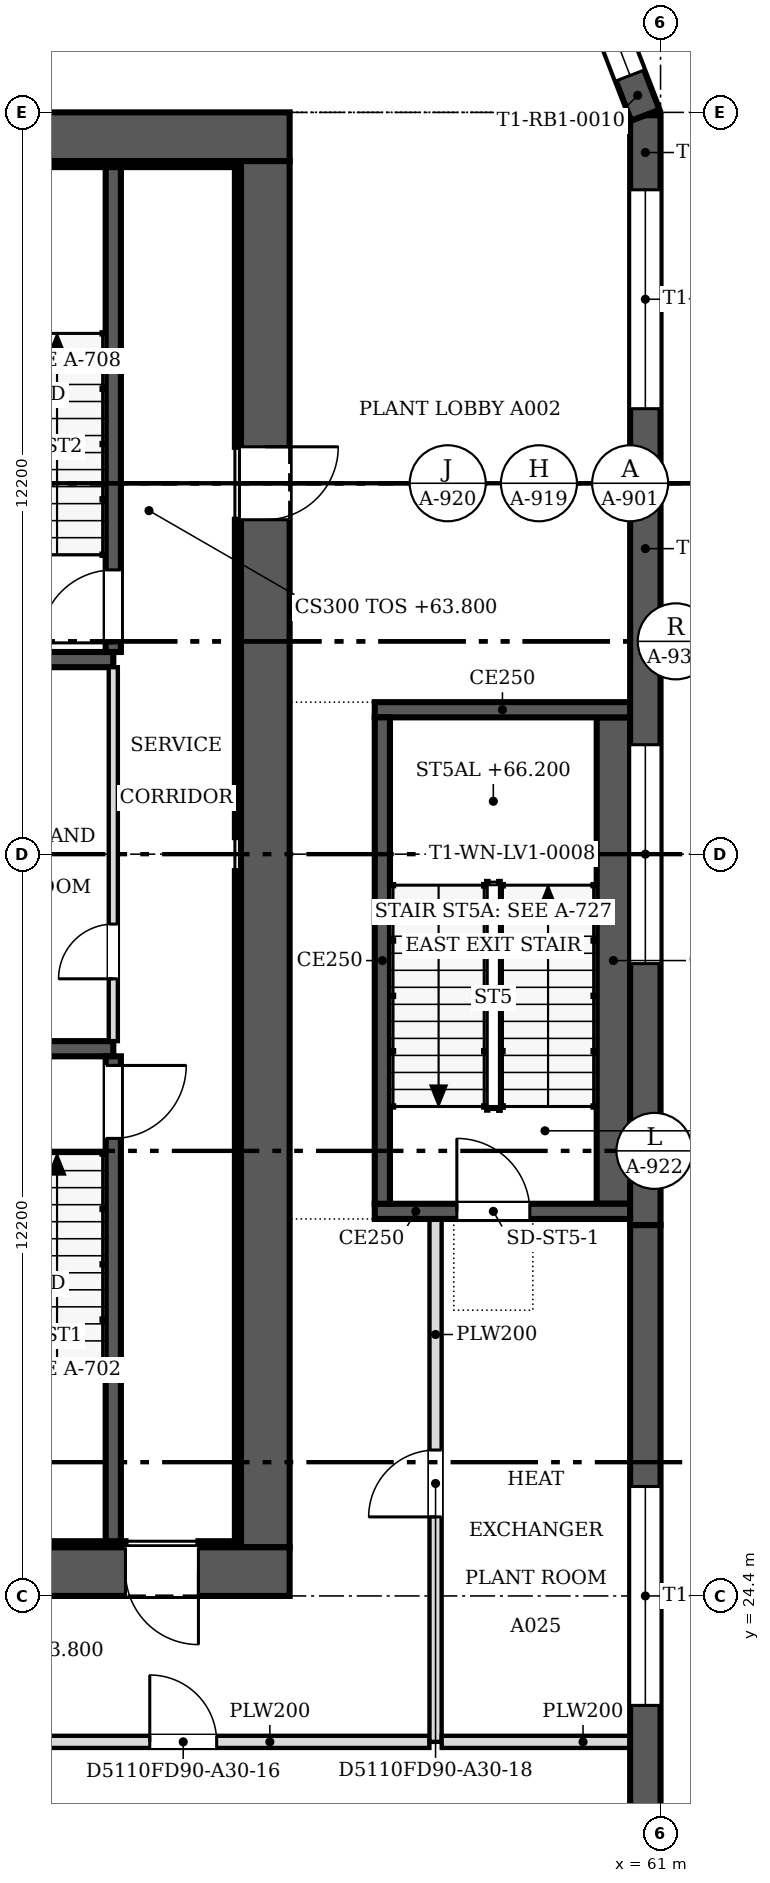
"""IFC4 building model, lengths in metres.
Left out: names, types, materials, properties, quantities, classifications, styles, units other than length and angle.
Written with IfcOpenShell. Run it as: python <this file> out.ifc"""

import sys

from ifc_helpers import new_model, si_unit, direction, frame, frame_2d, origin, place, context, subcontext, project, spatial, polyline, rectangle, outline, extrude, faceted_brep, source, transform, mapped, element, fill, save


model = new_model("IFC4")
c1 = context("Model", 3, precision=1e-05, world=origin(), true_north=direction((0.0, 1.0)))
c2 = subcontext(c1, "Body", "Model", "MODEL_VIEW")
j1 = project(units=[si_unit("LENGTHUNIT", "METRE"), si_unit("PLANEANGLEUNIT", "RADIAN")], contexts=[c1])
p1 = place(None, origin())
s1 = spatial("IfcSite", under=j1, at=p1, CompositionType="ELEMENT")
p2 = place(p1, origin())
s2 = spatial("IfcBuilding", under=s1, at=p2, CompositionType="ELEMENT")
p3 = place(p2, frame((0.0, 0.0, 63.8)))
s3 = spatial("IfcBuildingStorey", under=s2, at=p3, CompositionType="ELEMENT", Elevation=63.8)
m1 = source(origin(), c2, "Body", "SweptSolid", [
    extrude(outline(polyline([(0.0, 0.0), (12.2, 0.0), (12.2, 4.8), (0.0, 4.8), (0.0, 0.0)])), frame((0.0, 0.25, 0.0), z_axis=(0.0, -1.0, 0.0), x_axis=(1.0, 0.0, 0.0)), (0.0, 0.0, 1.0), 0.5),
])
p4 = place(p3, frame((60.75, 18.3, 0.0), z_axis=(0.0, 0.0, 1.0), x_axis=(0.0, 1.0, 0.0)))
e1 = element("IfcWall", 1, at=p4, inside=s3, PredefinedType="SOLIDWALL", context=c2, shape_type="MappedRepresentation", body=[
    mapped(m1, transform((0.0, 0.0, 0.0), scale=1.0)),
])
m2 = source(origin(), c2, "Body", "SweptSolid", [
    extrude(outline(polyline([(4.3, 0.8), (7.9, 0.8), (7.9, 4.0), (4.3, 4.0), (4.3, 0.8)])), frame((0.0, 0.26, 0.0), z_axis=(0.0, -1.0, 0.0), x_axis=(1.0, 0.0, 0.0)), (0.0, 0.0, 1.0), 0.52),
])
p5 = place(p4, origin())
e2 = element("IfcOpeningElement", 2, at=p5, cuts=e1, PredefinedType="OPENING", context=c2, shape_type="MappedRepresentation", body=[
    mapped(m2, transform((0.0, 0.0, 0.0), scale=1.0)),
])
p6 = place(p3, frame((60.75, 30.5, 0.0), z_axis=(0.0, 0.0, 1.0), x_axis=(0.0, 1.0, 0.0)))
e3 = element("IfcWall", 3, at=p6, inside=s3, PredefinedType="SOLIDWALL", context=c2, shape_type="MappedRepresentation", body=[
    mapped(m1, transform((0.0, 0.0, 0.0), scale=1.0)),
])
p7 = place(p6, origin())
e4 = element("IfcOpeningElement", 4, at=p7, cuts=e3, PredefinedType="OPENING", context=c2, shape_type="MappedRepresentation", body=[
    mapped(m2, transform((0.0, 0.0, 0.0), scale=1.0)),
])
m3 = source(origin(), c2, "Body", "Brep", [
    faceted_brep([(0.0, -0.25, 0.0), (6.053, -0.25, 0.0), (6.053, -0.25, 4.8), (0.0, -0.25, 4.8), (0.0, 0.25, 4.8), (6.007, 0.25, 4.8), (6.007, 0.25, 0.0), (0.0, 0.25, 0.0), (6.053, 0.0, 0.0), (6.053, 0.0, 4.8)], [[[0, 1, 2, 3]], [[4, 5, 6, 7]], [[7, 6, 8, 1, 0]], [[9, 2, 1, 8]], [[5, 4, 3, 2, 9]], [[4, 7, 0, 3]], [[8, 6, 5, 9]]]),
])
p8 = place(p3, frame((60.75, 42.7, 0.0), z_axis=(0.0, 0.0, 1.0), x_axis=(0.0, 1.0, 0.0)))
e5 = element("IfcWall", 5, at=p8, inside=s3, PredefinedType="SOLIDWALL", context=c2, shape_type="MappedRepresentation", body=[
    mapped(m3, transform((0.0, 0.0, 0.0), scale=1.0)),
])
m4 = source(origin(), c2, "Body", "SweptSolid", [
    extrude(outline(polyline([(1.227, 0.8), (4.827, 0.8), (4.827, 4.0), (1.227, 4.0), (1.227, 0.8)])), frame((0.0, 0.26, 0.0), z_axis=(0.0, -1.0, 0.0), x_axis=(1.0, 0.0, 0.0)), (0.0, 0.0, 1.0), 0.52),
])
p9 = place(p8, origin())
e6 = element("IfcOpeningElement", 6, at=p9, cuts=e5, PredefinedType="OPENING", context=c2, shape_type="MappedRepresentation", body=[
    mapped(m4, transform((0.0, 0.0, 0.0), scale=1.0)),
])
m5 = source(origin(), c2, "Body", "Brep", [
    faceted_brep([(0.0, -0.25, 0.0), (2.95, -0.25, 0.0), (2.95, -0.25, 4.8), (0.0, -0.25, 4.8), (0.047, 0.25, 4.8), (2.898, 0.25, 4.8), (2.898, 0.25, 0.0), (0.047, 0.25, 0.0), (2.95, 0.0, 0.0), (0.0, 0.0, 0.0), (2.95, 0.0, 4.8), (0.0, 0.0, 4.8)], [[[0, 1, 2, 3]], [[4, 5, 6, 7]], [[7, 6, 8, 1, 0, 9]], [[10, 2, 1, 8]], [[5, 4, 11, 3, 2, 10]], [[9, 0, 3, 11]], [[7, 9, 11, 4]], [[8, 6, 5, 10]]]),
])
p10 = place(p3, frame((60.75, 48.753, 0.0), z_axis=(0.0, 0.0, 1.0), x_axis=(-0.359877213415, 0.932999673775, 0.0)))
e7 = element("IfcWall", 7, at=p10, inside=s3, PredefinedType="SOLIDWALL", context=c2, shape_type="MappedRepresentation", body=[
    mapped(m5, transform((0.0, 0.0, 0.0), scale=1.0)),
])
m6 = source(origin(), c2, "Body", "SweptSolid", [
    extrude(outline(polyline([(0.7, 0.8), (2.25, 0.8), (2.25, 4.0), (0.7, 4.0), (0.7, 0.8)])), frame((0.0, 0.26, 0.0), z_axis=(0.0, -1.0, 0.0), x_axis=(1.0, 0.0, 0.0)), (0.0, 0.0, 1.0), 0.52),
])
p11 = place(p10, origin())
e8 = element("IfcOpeningElement", 8, at=p11, cuts=e7, PredefinedType="OPENING", context=c2, shape_type="MappedRepresentation", body=[
    mapped(m6, transform((0.0, 0.0, 0.0), scale=1.0)),
])
p12 = place(p3, frame((54.9, 24.8, 0.0), z_axis=(0.0, 0.0, 1.0), x_axis=(-1.0, 0.0, 0.0)))
e9 = element("IfcWall", 9, at=p12, inside=s3, PredefinedType="SHEAR", context=c2, shape_type="SweptSolid", body=[
    extrude(rectangle(XDim=24.4, YDim=0.8, at=frame_2d((12.2, 0.0))), origin(), (0.0, 0.0, 1.0), 4.8),
])
m7 = source(origin(), c2, "Body", "SweptSolid", [
    extrude(rectangle(XDim=1.2, YDim=2.1, at=frame_2d((0.6, 1.05))), frame((0.0, 0.41, 0.0), z_axis=(0.0, -1.0, 0.0), x_axis=(1.0, 0.0, 0.0)), (0.0, 0.0, 1.0), 0.82),
])
p13 = place(p12, frame((1.5, 0.0, 0.0)))
e10 = element("IfcOpeningElement", 10, at=p13, cuts=e9, PredefinedType="OPENING", context=c2, shape_type="MappedRepresentation", body=[
    mapped(m7, transform((0.0, 0.0, 0.0), scale=1.0)),
])
p14 = place(p3, frame((30.5, 48.4, 0.0), z_axis=(0.0, 0.0, 1.0), x_axis=(1.0, 0.0, 0.0)))
e11 = element("IfcWall", 11, at=p14, inside=s3, PredefinedType="SHEAR", context=c2, shape_type="SweptSolid", body=[
    extrude(rectangle(XDim=24.4, YDim=0.8, at=frame_2d((12.2, 0.0))), origin(), (0.0, 0.0, 1.0), 4.8),
])
p15 = place(p3, frame((54.5, 48.0, 0.0), z_axis=(0.0, 0.0, 1.0), x_axis=(0.0, -1.0, 0.0)))
e12 = element("IfcWall", 12, at=p15, inside=s3, PredefinedType="SHEAR", context=c2, shape_type="SweptSolid", body=[
    extrude(rectangle(XDim=22.8, YDim=0.8, at=frame_2d((11.4, 0.0))), origin(), (0.0, 0.0, 1.0), 4.8),
])
p16 = place(p15, frame((4.7, 0.0, 0.0)))
e13 = element("IfcOpeningElement", 13, at=p16, cuts=e12, PredefinedType="OPENING", context=c2, shape_type="MappedRepresentation", body=[
    mapped(m7, transform((0.0, 0.0, 0.0), scale=1.0)),
])
p17 = place(p3, frame((31.3, 25.25, 0.0), z_axis=(0.0, 0.0, 1.0), x_axis=(1.0, 0.0, 0.0)))
e14 = element("IfcWall", 14, at=p17, inside=s3, PredefinedType="SOLIDWALL", context=c2, shape_type="SweptSolid", body=[
    extrude(rectangle(XDim=20.9, YDim=0.1, at=frame_2d((10.45, 0.0))), origin(), (0.0, 0.0, 1.0), 4.8),
])
p18 = place(p3, frame((53.4, 25.25, 0.0), z_axis=(0.0, 0.0, 1.0), x_axis=(1.0, 0.0, 0.0)))
e15 = element("IfcWall", 15, at=p18, inside=s3, PredefinedType="SOLIDWALL", context=c2, shape_type="SweptSolid", body=[
    extrude(rectangle(XDim=0.7, YDim=0.1, at=frame_2d((0.35, 0.0))), origin(), (0.0, 0.0, 1.0), 4.8),
])
p19 = place(p3, frame((31.3, 47.95, 0.0), z_axis=(0.0, 0.0, 1.0), x_axis=(1.0, 0.0, 0.0)))
e16 = element("IfcWall", 16, at=p19, inside=s3, PredefinedType="SOLIDWALL", context=c2, shape_type="SweptSolid", body=[
    extrude(rectangle(XDim=22.8, YDim=0.1, at=frame_2d((11.4, 0.0))), origin(), (0.0, 0.0, 1.0), 4.8),
])
p20 = place(p3, frame((54.05, 25.3, 0.0), z_axis=(0.0, 0.0, 1.0), x_axis=(0.0, 1.0, 0.0)))
e17 = element("IfcWall", 17, at=p20, inside=s3, PredefinedType="SOLIDWALL", context=c2, shape_type="SweptSolid", body=[
    extrude(rectangle(XDim=11.02, YDim=0.1, at=frame_2d((5.51, 0.0))), origin(), (0.0, 0.0, 1.0), 4.8),
])
p21 = place(p3, frame((54.05, 36.88, 0.0), z_axis=(0.0, 0.0, 1.0), x_axis=(0.0, 1.0, 0.0)))
e18 = element("IfcWall", 18, at=p21, inside=s3, PredefinedType="SOLIDWALL", context=c2, shape_type="SweptSolid", body=[
    extrude(rectangle(XDim=5.22, YDim=0.1, at=frame_2d((2.61, 0.0))), origin(), (0.0, 0.0, 1.0), 4.8),
])
p22 = place(p3, frame((54.05, 43.3, 0.0), z_axis=(0.0, 0.0, 1.0), x_axis=(0.0, 1.0, 0.0)))
e19 = element("IfcWall", 19, at=p22, inside=s3, PredefinedType="SOLIDWALL", context=c2, shape_type="SweptSolid", body=[
    extrude(rectangle(XDim=4.6, YDim=0.1, at=frame_2d((2.3, 0.0))), origin(), (0.0, 0.0, 1.0), 4.8),
])
for number, where, z_axis, x_axis in (
    (20, (48.475, 33.4, 0.0), (0.0, 0.0, 1.0), (1.0, 0.0, 0.0)),
    (21, (48.475, 39.8, 0.0), (0.0, 0.0, 1.0), (1.0, 0.0, 0.0)),
):
    element("IfcWall", number, at=place(p3, frame(where, z_axis=z_axis, x_axis=x_axis)), inside=s3, PredefinedType="SOLIDWALL", context=c2, shape_type="SweptSolid", body=[
        extrude(rectangle(XDim=3.525, YDim=0.25, at=frame_2d((1.762, 0.0))), origin(), (0.0, 0.0, 1.0), 4.8),
    ])
p23 = place(p3, frame((52.0, 25.3, 0.0), z_axis=(0.0, 0.0, 1.0), x_axis=(0.0, 1.0, 0.0)))
e22 = element("IfcWall", 22, at=p23, inside=s3, PredefinedType="SOLIDWALL", context=c2, shape_type="SweptSolid", body=[
    extrude(rectangle(XDim=7.975, YDim=0.25, at=frame_2d((3.987, 0.0))), origin(), (0.0, 0.0, 1.0), 4.8),
])
m8 = source(origin(), c2, "Body", "SweptSolid", [
    extrude(rectangle(XDim=1.2, YDim=2.1, at=frame_2d((0.6, 1.05))), frame((0.0, 0.135, 0.0), z_axis=(0.0, -1.0, 0.0), x_axis=(1.0, 0.0, 0.0)), (0.0, 0.0, 1.0), 0.27),
])
p24 = place(p23, frame((6.625, 0.0, 0.0)))
e23 = element("IfcOpeningElement", 23, at=p24, cuts=e22, PredefinedType="OPENING", context=c2, shape_type="MappedRepresentation", body=[
    mapped(m8, transform((0.0, 0.0, 0.0), scale=1.0)),
])
p25 = place(p3, frame((52.0, 39.925, 0.0), z_axis=(0.0, 0.0, 1.0), x_axis=(0.0, 1.0, 0.0)))
e24 = element("IfcWall", 24, at=p25, inside=s3, PredefinedType="SOLIDWALL", context=c2, shape_type="SweptSolid", body=[
    extrude(rectangle(XDim=7.975, YDim=0.25, at=frame_2d((3.987, 0.0))), origin(), (0.0, 0.0, 1.0), 4.8),
])
p26 = place(p25, frame((0.15, 0.0, 0.0)))
e25 = element("IfcOpeningElement", 25, at=p26, cuts=e24, PredefinedType="OPENING", context=c2, shape_type="MappedRepresentation", body=[
    mapped(m8, transform((0.0, 0.0, 0.0), scale=1.0)),
])
p27 = place(p3, frame((52.0, 33.525, 0.0), z_axis=(0.0, 0.0, 1.0), x_axis=(0.0, 1.0, 0.0)))
e26 = element("IfcWall", 26, at=p27, inside=s3, PredefinedType="PARTITIONING", context=c2, shape_type="SweptSolid", body=[
    extrude(rectangle(XDim=6.15, YDim=0.15, at=frame_2d((3.075, 0.0))), origin(), (0.0, 0.0, 1.0), 4.6),
])
m9 = source(origin(), c2, "Body", "SweptSolid", [
    extrude(rectangle(XDim=0.9, YDim=2.1, at=frame_2d((0.45, 1.05))), frame((0.0, 0.085, 0.0), z_axis=(0.0, -1.0, 0.0), x_axis=(1.0, 0.0, 0.0)), (0.0, 0.0, 1.0), 0.17),
])
p28 = place(p27, frame((1.025, 0.0, 0.0)))
e27 = element("IfcOpeningElement", 27, at=p28, cuts=e26, PredefinedType="OPENING", context=c2, shape_type="MappedRepresentation", body=[
    mapped(m9, transform((0.0, 0.0, 0.0), scale=1.0)),
])
p29 = place(p3, frame((60.5, 30.725, 0.0), z_axis=(0.0, 0.0, 1.0), x_axis=(-1.0, 0.0, 0.0)))
e28 = element("IfcWall", 28, at=p29, inside=s3, PredefinedType="SOLIDWALL", context=c2, shape_type="SweptSolid", body=[
    extrude(rectangle(XDim=4.2, YDim=0.25, at=frame_2d((2.1, 0.0))), origin(), (0.0, 0.0, 1.0), 4.8),
])
p30 = place(p29, frame((1.65, 0.0, 0.0)))
e29 = element("IfcOpeningElement", 29, at=p30, cuts=e28, PredefinedType="OPENING", context=c2, shape_type="MappedRepresentation", body=[
    mapped(m8, transform((0.0, 0.0, 0.0), scale=1.0)),
])
p31 = place(p3, frame((56.425, 30.85, 0.0), z_axis=(0.0, 0.0, 1.0), x_axis=(0.0, 1.0, 0.0)))
e30 = element("IfcWall", 30, at=p31, inside=s3, PredefinedType="SOLIDWALL", context=c2, shape_type="SweptSolid", body=[
    extrude(rectangle(XDim=8.0, YDim=0.25, at=frame_2d((4.0, 0.0))), origin(), (0.0, 0.0, 1.0), 4.8),
])
p32 = place(p3, frame((56.3, 38.975, 0.0), z_axis=(0.0, 0.0, 1.0), x_axis=(1.0, 0.0, 0.0)))
e31 = element("IfcWall", 31, at=p32, inside=s3, PredefinedType="SOLIDWALL", context=c2, shape_type="SweptSolid", body=[
    extrude(rectangle(XDim=4.2, YDim=0.25, at=frame_2d((2.1, 0.0))), origin(), (0.0, 0.0, 1.0), 4.8),
])
p33 = place(p3, frame((60.225, 38.85, 0.0), z_axis=(0.0, 0.0, 1.0), x_axis=(0.0, -1.0, 0.0)))
e32 = element("IfcWall", 32, at=p33, inside=s3, PredefinedType="SOLIDWALL", context=c2, shape_type="SweptSolid", body=[
    extrude(rectangle(XDim=8.0, YDim=0.55, at=frame_2d((4.0, 0.0))), origin(), (0.0, 0.0, 1.0), 4.8),
])
p34 = place(p3, frame((57.199, 22.0, 0.0), z_axis=(0.0, 0.0, 1.0), x_axis=(-1.0, 0.0, 0.0)))
e33 = element("IfcWall", 33, at=p34, inside=s3, PredefinedType="PARTITIONING", context=c2, shape_type="SweptSolid", body=[
    extrude(rectangle(XDim=7.999, YDim=0.2, at=frame_2d((4.0, 0.0))), origin(), (0.0, 0.0, 1.0), 4.067),
])
m10 = source(origin(), c2, "Body", "SweptSolid", [
    extrude(rectangle(XDim=1.1, YDim=2.1, at=frame_2d((0.55, 1.05))), frame((0.0, 0.11, 0.0), z_axis=(0.0, -1.0, 0.0), x_axis=(1.0, 0.0, 0.0)), (0.0, 0.0, 1.0), 0.22),
])
p35 = place(p34, frame((3.499, 0.0, 0.0)))
e34 = element("IfcOpeningElement", 34, at=p35, cuts=e33, PredefinedType="OPENING", context=c2, shape_type="MappedRepresentation", body=[
    mapped(m10, transform((0.0, 0.0, 0.0), scale=1.0)),
])
p36 = place(p3, frame((57.3, 30.6, 0.0), z_axis=(0.0, 0.0, 1.0), x_axis=(0.0, -1.0, 0.0)))
e35 = element("IfcWall", 35, at=p36, inside=s3, PredefinedType="PARTITIONING", context=c2, shape_type="SweptSolid", body=[
    extrude(rectangle(XDim=8.6, YDim=0.2, at=frame_2d((4.3, 0.0))), origin(), (0.0, 0.0, 1.0), 4.067),
])
p37 = place(p36, frame((3.8, 0.0, 0.0)))
e36 = element("IfcOpeningElement", 36, at=p37, cuts=e35, PredefinedType="OPENING", context=c2, shape_type="MappedRepresentation", body=[
    mapped(m10, transform((0.0, 0.0, 0.0), scale=1.0)),
])
p38 = place(p3, frame((57.401, 22.0, 0.0), z_axis=(0.0, 0.0, 1.0), x_axis=(1.0, 0.0, 0.0)))
e37 = element("IfcWall", 37, at=p38, inside=s3, PredefinedType="PARTITIONING", context=c2, shape_type="SweptSolid", body=[
    extrude(rectangle(XDim=3.099, YDim=0.2, at=frame_2d((1.55, 0.0))), origin(), (0.0, 0.0, 1.0), 4.067),
])
m11 = source(origin(), c2, "Body", "SweptSolid", [
    extrude(outline(polyline([(4.3, 0.8), (7.9, 0.8), (7.9, 4.0), (4.3, 4.0), (4.3, 0.8)])), frame((0.0, 0.03, 0.0), z_axis=(0.0, -1.0, 0.0), x_axis=(1.0, 0.0, 0.0)), (0.0, 0.0, 1.0), 0.06),
])
p39 = place(p5, origin())
e38 = element("IfcWindow", 38, at=p39, inside=s3, PartitioningType="USERDEFINED", PredefinedType="WINDOW", context=c2, shape_type="MappedRepresentation", body=[
    mapped(m11, transform((0.0, 0.0, 0.0), scale=1.0)),
])
fill(e2, e38)
p40 = place(p7, origin())
e39 = element("IfcWindow", 39, at=p40, inside=s3, PartitioningType="USERDEFINED", PredefinedType="WINDOW", context=c2, shape_type="MappedRepresentation", body=[
    mapped(m11, transform((0.0, 0.0, 0.0), scale=1.0)),
])
fill(e4, e39)
m12 = source(origin(), c2, "Body", "SweptSolid", [
    extrude(outline(polyline([(1.227, 0.8), (4.827, 0.8), (4.827, 4.0), (1.227, 4.0), (1.227, 0.8)])), frame((0.0, 0.03, 0.0), z_axis=(0.0, -1.0, 0.0), x_axis=(1.0, 0.0, 0.0)), (0.0, 0.0, 1.0), 0.06),
])
p41 = place(p9, origin())
e40 = element("IfcWindow", 40, at=p41, inside=s3, PartitioningType="USERDEFINED", PredefinedType="WINDOW", context=c2, shape_type="MappedRepresentation", body=[
    mapped(m12, transform((0.0, 0.0, 0.0), scale=1.0)),
])
fill(e6, e40)
m13 = source(origin(), c2, "Body", "SweptSolid", [
    extrude(outline(polyline([(0.7, 0.8), (2.25, 0.8), (2.25, 4.0), (0.7, 4.0), (0.7, 0.8)])), frame((0.0, 0.03, 0.0), z_axis=(0.0, -1.0, 0.0), x_axis=(1.0, 0.0, 0.0)), (0.0, 0.0, 1.0), 0.06),
])
p42 = place(p11, origin())
e41 = element("IfcWindow", 41, at=p42, inside=s3, PartitioningType="USERDEFINED", PredefinedType="WINDOW", context=c2, shape_type="MappedRepresentation", body=[
    mapped(m13, transform((0.0, 0.0, 0.0), scale=1.0)),
])
fill(e8, e41)
m14 = source(origin(), c2, "Body", "SweptSolid", [
    extrude(rectangle(XDim=1.2, YDim=2.1, at=frame_2d((0.6, 1.05))), frame((0.0, 0.025, 0.0), z_axis=(0.0, -1.0, 0.0), x_axis=(1.0, 0.0, 0.0)), (0.0, 0.0, 1.0), 0.05),
])
p43 = place(p13, origin())
e42 = element("IfcDoor", 42, at=p43, inside=s3, OperationType="SINGLE_SWING_LEFT", PredefinedType="DOOR", context=c2, shape_type="MappedRepresentation", body=[
    mapped(m14, transform((0.0, 0.0, 0.0), scale=1.0)),
])
fill(e10, e42)
p44 = place(p16, origin())
e43 = element("IfcDoor", 43, at=p44, inside=s3, OperationType="SINGLE_SWING_LEFT", PredefinedType="DOOR", context=c2, shape_type="MappedRepresentation", body=[
    mapped(m14, transform((0.0, 0.0, 0.0), scale=1.0)),
])
fill(e13, e43)
p45 = place(p24, origin())
e44 = element("IfcDoor", 44, at=p45, inside=s3, OperationType="SINGLE_SWING_RIGHT", PredefinedType="DOOR", context=c2, shape_type="MappedRepresentation", body=[
    mapped(m14, transform((0.0, 0.0, 0.0), scale=1.0)),
])
fill(e23, e44)
p46 = place(p26, origin())
e45 = element("IfcDoor", 45, at=p46, inside=s3, OperationType="SINGLE_SWING_LEFT", PredefinedType="DOOR", context=c2, shape_type="MappedRepresentation", body=[
    mapped(m14, transform((0.0, 0.0, 0.0), scale=1.0)),
])
fill(e25, e45)
m15 = source(origin(), c2, "Body", "SweptSolid", [
    extrude(rectangle(XDim=0.9, YDim=2.1, at=frame_2d((0.45, 1.05))), frame((0.0, 0.025, 0.0), z_axis=(0.0, -1.0, 0.0), x_axis=(1.0, 0.0, 0.0)), (0.0, 0.0, 1.0), 0.05),
])
p47 = place(p28, origin())
e46 = element("IfcDoor", 46, at=p47, inside=s3, OperationType="SINGLE_SWING_LEFT", PredefinedType="DOOR", context=c2, shape_type="MappedRepresentation", body=[
    mapped(m15, transform((0.0, 0.0, 0.0), scale=1.0)),
])
fill(e27, e46)
p48 = place(p30, origin())
e47 = element("IfcDoor", 47, at=p48, inside=s3, OperationType="SINGLE_SWING_RIGHT", PredefinedType="DOOR", context=c2, shape_type="MappedRepresentation", body=[
    mapped(m14, transform((0.0, 0.0, 0.0), scale=1.0)),
])
fill(e29, e47)
m16 = source(origin(), c2, "Body", "SweptSolid", [
    extrude(rectangle(XDim=1.1, YDim=2.1, at=frame_2d((0.55, 1.05))), frame((0.0, 0.025, 0.0), z_axis=(0.0, -1.0, 0.0), x_axis=(1.0, 0.0, 0.0)), (0.0, 0.0, 1.0), 0.05),
])
p49 = place(p35, origin())
e48 = element("IfcDoor", 48, at=p49, inside=s3, OperationType="SINGLE_SWING_RIGHT", PredefinedType="DOOR", context=c2, shape_type="MappedRepresentation", body=[
    mapped(m16, transform((0.0, 0.0, 0.0), scale=1.0)),
])
fill(e34, e48)
p50 = place(p37, origin())
e49 = element("IfcDoor", 49, at=p50, inside=s3, OperationType="SINGLE_SWING_RIGHT", PredefinedType="DOOR", context=c2, shape_type="MappedRepresentation", body=[
    mapped(m16, transform((0.0, 0.0, 0.0), scale=1.0)),
])
fill(e36, e49)
save(model, sys.argv[1])
